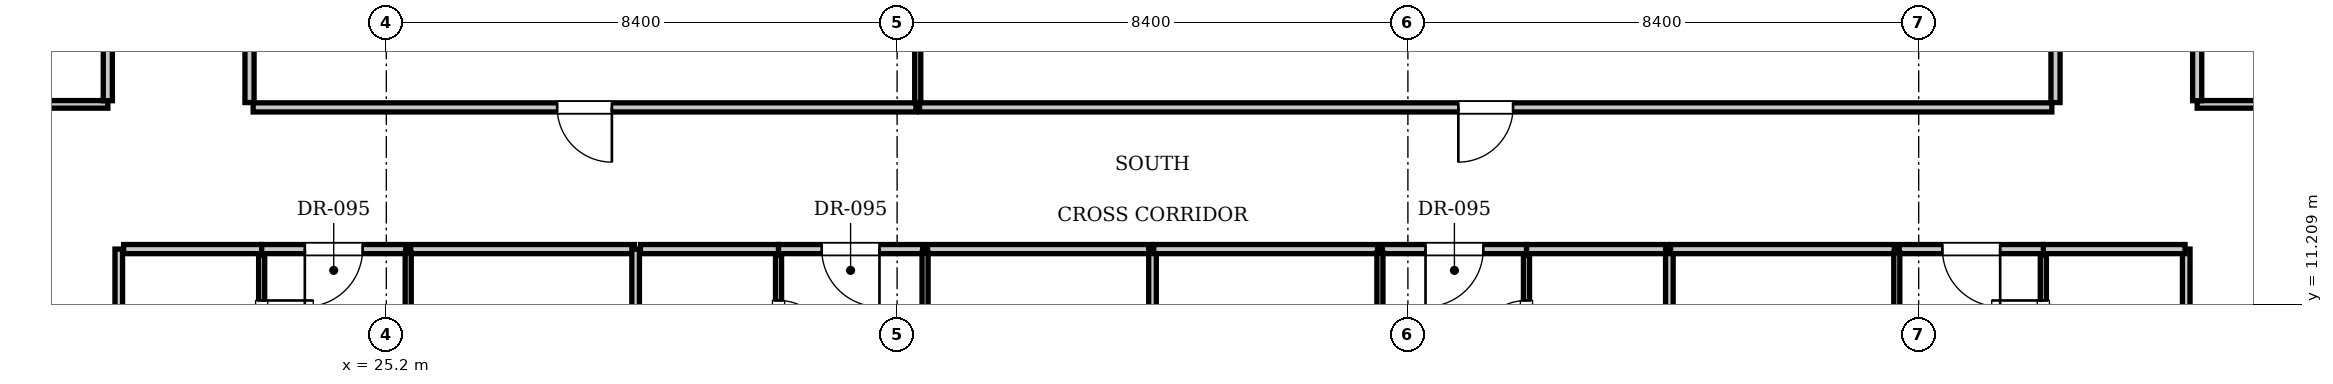
"""IFC4 building model, lengths in metres.
Left out: names, types, materials, properties, quantities, classifications, styles, units other than length and angle.
Written with IfcOpenShell. Run it as: python <this file> out.ifc"""

import sys

from ifc_helpers import new_model, si_unit, direction, frame, frame_2d, origin, place, context, subcontext, project, spatial, rectangle, extrude, element, fill, save


model = new_model("IFC4")
c1 = context("Model", 3, precision=1e-05, world=origin(), true_north=direction((0.0, 1.0)))
c2 = subcontext(c1, "Body", "Model", "MODEL_VIEW")
j1 = project(units=[si_unit("LENGTHUNIT", "METRE"), si_unit("PLANEANGLEUNIT", "RADIAN")], contexts=[c1])
p1 = place(None, origin())
s1 = spatial("IfcSite", under=j1, at=p1, CompositionType="ELEMENT")
p2 = place(p1, origin())
s2 = spatial("IfcBuilding", under=s1, at=p2, CompositionType="ELEMENT")
p3 = place(p2, frame((0.0, 0.0, 96.25)))
s3 = spatial("IfcBuildingStorey", under=s2, at=p3, CompositionType="ELEMENT", Elevation=96.25)
for number, where, z_axis, x_axis in (
    (1, (22.95, 14.53, 0.0), (0.0, 0.0, 1.0), (0.0, 1.0, 0.0)),
    (2, (52.65, 14.53, 0.0), (0.0, 0.0, 1.0), (0.0, 1.0, 0.0)),
):
    element("IfcWall", number, at=place(p3, frame(where, z_axis=z_axis, x_axis=x_axis)), inside=s3, PredefinedType="PARTITIONING", context=c2, shape_type="SweptSolid", body=[
        extrude(rectangle(XDim=8.43, YDim=0.15, at=frame_2d((4.215, 0.0))), origin(), (0.0, 0.0, 1.0), 3.61),
    ])
p4 = place(p3, frame((23.01, 14.45, 0.0), z_axis=(0.0, 0.0, 1.0), x_axis=(1.0, 0.0, 0.0)))
e3 = element("IfcWall", 3, at=p4, inside=s3, PredefinedType="PARTITIONING", context=c2, shape_type="SweptSolid", body=[
    extrude(rectangle(XDim=10.899, YDim=0.15, at=frame_2d((5.449, 0.0))), origin(), (0.0, 0.0, 1.0), 3.61),
])
p5 = place(p4, frame((5.0, 0.0, 0.0)))
e4 = element("IfcOpeningElement", 4, at=p5, cuts=e3, PredefinedType="OPENING", context=c2, shape_type="SweptSolid", body=[
    extrude(rectangle(XDim=0.9, YDim=2.1, at=frame_2d((0.45, 1.05))), frame((0.0, 0.085, 0.0), z_axis=(0.0, -1.0, 0.0), x_axis=(1.0, 0.0, 0.0)), (0.0, 0.0, 1.0), 0.17),
])
p6 = place(p3, frame((33.939, 14.53, 0.0), z_axis=(0.0, 0.0, 1.0), x_axis=(0.0, 1.0, 0.0)))
e5 = element("IfcWall", 5, at=p6, inside=s3, PredefinedType="PARTITIONING", context=c2, shape_type="SweptSolid", body=[
    extrude(rectangle(XDim=8.43, YDim=0.1, at=frame_2d((4.215, 0.0))), origin(), (0.0, 0.0, 1.0), 3.61),
])
p7 = place(p3, frame((33.969, 14.45, 0.0), z_axis=(0.0, 0.0, 1.0), x_axis=(1.0, 0.0, 0.0)))
e6 = element("IfcWall", 6, at=p7, inside=s3, PredefinedType="PARTITIONING", context=c2, shape_type="SweptSolid", body=[
    extrude(rectangle(XDim=18.621, YDim=0.15, at=frame_2d((9.311, 0.0))), origin(), (0.0, 0.0, 1.0), 3.61),
])
p8 = place(p7, frame((8.861, 0.0, 0.0)))
e7 = element("IfcOpeningElement", 7, at=p8, cuts=e6, PredefinedType="OPENING", context=c2, shape_type="SweptSolid", body=[
    extrude(rectangle(XDim=0.9, YDim=2.1, at=frame_2d((0.45, 1.05))), frame((0.0, 0.085, 0.0), z_axis=(0.0, -1.0, 0.0), x_axis=(1.0, 0.0, 0.0)), (0.0, 0.0, 1.0), 0.17),
])
for number, where, z_axis, x_axis in (
    (8, (20.8, 0.1, 0.0), (0.0, 0.0, 1.0), (0.0, 1.0, 0.0)),
    (9, (54.8, 0.1, 0.0), (0.0, 0.0, 1.0), (0.0, 1.0, 0.0)),
):
    element("IfcWall", number, at=place(p3, frame(where, z_axis=z_axis, x_axis=x_axis)), inside=s3, PredefinedType="PARTITIONING", context=c2, shape_type="SweptSolid", body=[
        extrude(rectangle(XDim=12.02, YDim=0.125, at=frame_2d((6.01, 0.0))), origin(), (0.0, 0.0, 1.0), 3.61),
    ])
p9 = place(p3, frame((20.88, 12.12, 0.0), z_axis=(0.0, 0.0, 1.0), x_axis=(1.0, 0.0, 0.0)))
e10 = element("IfcWall", 10, at=p9, inside=s3, PredefinedType="PARTITIONING", context=c2, shape_type="SweptSolid", body=[
    extrude(rectangle(XDim=2.27, YDim=0.15, at=frame_2d((1.135, 0.0))), origin(), (0.0, 0.0, 1.0), 3.61),
])
p10 = place(p3, frame((23.15, 9.68, 0.0), z_axis=(0.0, 0.0, 1.0), x_axis=(0.0, 1.0, 0.0)))
e11 = element("IfcWall", 11, at=p10, inside=s3, PredefinedType="PARTITIONING", context=c2, shape_type="SweptSolid", body=[
    extrude(rectangle(XDim=2.34, YDim=0.1, at=frame_2d((1.17, 0.0))), origin(), (0.0, 0.0, 1.0), 3.61),
])
p11 = place(p10, frame((0.745, 0.0, 0.0)))
e12 = element("IfcOpeningElement", 12, at=p11, cuts=e11, PredefinedType="OPENING", context=c2, shape_type="SweptSolid", body=[
    extrude(rectangle(XDim=0.85, YDim=2.1, at=frame_2d((0.425, 1.05))), frame((0.0, 0.06, 0.0), z_axis=(0.0, -1.0, 0.0), x_axis=(1.0, 0.0, 0.0)), (0.0, 0.0, 1.0), 0.12),
])
p12 = place(p3, frame((23.15, 12.12, 0.0), z_axis=(0.0, 0.0, 1.0), x_axis=(1.0, 0.0, 0.0)))
e13 = element("IfcWall", 13, at=p12, inside=s3, PredefinedType="PARTITIONING", context=c2, shape_type="SweptSolid", body=[
    extrude(rectangle(XDim=2.37, YDim=0.15, at=frame_2d((1.185, 0.0))), origin(), (0.0, 0.0, 1.0), 3.61),
])
p13 = place(p12, frame((0.71, 0.0, 0.0)))
e14 = element("IfcOpeningElement", 14, at=p13, cuts=e13, PredefinedType="OPENING", context=c2, shape_type="SweptSolid", body=[
    extrude(rectangle(XDim=0.95, YDim=2.15, at=frame_2d((0.475, 1.075))), frame((0.0, 0.085, 0.0), z_axis=(0.0, -1.0, 0.0), x_axis=(1.0, 0.0, 0.0)), (0.0, 0.0, 1.0), 0.17),
])
p14 = place(p3, frame((25.6, 12.12, 0.0), z_axis=(0.0, 0.0, 1.0), x_axis=(1.0, 0.0, 0.0)))
e15 = element("IfcWall", 15, at=p14, inside=s3, PredefinedType="PARTITIONING", context=c2, shape_type="SweptSolid", body=[
    extrude(rectangle(XDim=3.68, YDim=0.15, at=frame_2d((1.84, 0.0))), origin(), (0.0, 0.0, 1.0), 3.61),
])
p15 = place(p3, frame((25.56, 0.03, 0.0), z_axis=(0.0, 0.0, 1.0), x_axis=(0.0, 1.0, 0.0)))
e16 = element("IfcWall", 16, at=p15, inside=s3, PredefinedType="PARTITIONING", context=c2, shape_type="SweptSolid", body=[
    extrude(rectangle(XDim=12.03, YDim=0.1, at=frame_2d((6.015, 0.0))), origin(), (0.0, 0.0, 1.0), 3.61),
])
p16 = place(p15, frame((1.6, 0.0, 0.0)))
e17 = element("IfcOpeningElement", 17, at=p16, cuts=e16, PredefinedType="OPENING", context=c2, shape_type="SweptSolid", body=[
    extrude(rectangle(XDim=0.9, YDim=2.1, at=frame_2d((0.45, 1.05))), frame((0.0, 0.06, 0.0), z_axis=(0.0, -1.0, 0.0), x_axis=(1.0, 0.0, 0.0)), (0.0, 0.0, 1.0), 0.12),
])
p17 = place(p3, frame((29.3, 0.1, 0.0), z_axis=(0.0, 0.0, 1.0), x_axis=(0.0, 1.0, 0.0)))
e18 = element("IfcWall", 18, at=p17, inside=s3, PredefinedType="PARTITIONING", context=c2, shape_type="SweptSolid", body=[
    extrude(rectangle(XDim=12.02, YDim=0.125, at=frame_2d((6.01, 0.0))), origin(), (0.0, 0.0, 1.0), 3.293),
])
p18 = place(p3, frame((29.38, 12.12, 0.0), z_axis=(0.0, 0.0, 1.0), x_axis=(1.0, 0.0, 0.0)))
e19 = element("IfcWall", 19, at=p18, inside=s3, PredefinedType="PARTITIONING", context=c2, shape_type="SweptSolid", body=[
    extrude(rectangle(XDim=2.27, YDim=0.15, at=frame_2d((1.135, 0.0))), origin(), (0.0, 0.0, 1.0), 3.61),
])
p19 = place(p3, frame((31.65, 9.68, 0.0), z_axis=(0.0, 0.0, 1.0), x_axis=(0.0, 1.0, 0.0)))
e20 = element("IfcWall", 20, at=p19, inside=s3, PredefinedType="PARTITIONING", context=c2, shape_type="SweptSolid", body=[
    extrude(rectangle(XDim=2.34, YDim=0.1, at=frame_2d((1.17, 0.0))), origin(), (0.0, 0.0, 1.0), 3.61),
])
p20 = place(p19, frame((0.745, 0.0, 0.0)))
e21 = element("IfcOpeningElement", 21, at=p20, cuts=e20, PredefinedType="OPENING", context=c2, shape_type="SweptSolid", body=[
    extrude(rectangle(XDim=0.85, YDim=2.1, at=frame_2d((0.425, 1.05))), frame((0.0, 0.06, 0.0), z_axis=(0.0, -1.0, 0.0), x_axis=(1.0, 0.0, 0.0)), (0.0, 0.0, 1.0), 0.12),
])
p21 = place(p3, frame((31.65, 12.12, 0.0), z_axis=(0.0, 0.0, 1.0), x_axis=(1.0, 0.0, 0.0)))
e22 = element("IfcWall", 22, at=p21, inside=s3, PredefinedType="PARTITIONING", context=c2, shape_type="SweptSolid", body=[
    extrude(rectangle(XDim=2.37, YDim=0.15, at=frame_2d((1.185, 0.0))), origin(), (0.0, 0.0, 1.0), 3.61),
])
p22 = place(p21, frame((0.71, 0.0, 0.0)))
e23 = element("IfcOpeningElement", 23, at=p22, cuts=e22, PredefinedType="OPENING", context=c2, shape_type="SweptSolid", body=[
    extrude(rectangle(XDim=0.95, YDim=2.15, at=frame_2d((0.475, 1.075))), frame((0.0, 0.085, 0.0), z_axis=(0.0, -1.0, 0.0), x_axis=(1.0, 0.0, 0.0)), (0.0, 0.0, 1.0), 0.17),
])
p23 = place(p3, frame((34.1, 12.12, 0.0), z_axis=(0.0, 0.0, 1.0), x_axis=(1.0, 0.0, 0.0)))
e24 = element("IfcWall", 24, at=p23, inside=s3, PredefinedType="PARTITIONING", context=c2, shape_type="SweptSolid", body=[
    extrude(rectangle(XDim=3.68, YDim=0.15, at=frame_2d((1.84, 0.0))), origin(), (0.0, 0.0, 1.0), 3.61),
])
p24 = place(p3, frame((34.06, 0.03, 0.0), z_axis=(0.0, 0.0, 1.0), x_axis=(0.0, 1.0, 0.0)))
e25 = element("IfcWall", 25, at=p24, inside=s3, PredefinedType="PARTITIONING", context=c2, shape_type="SweptSolid", body=[
    extrude(rectangle(XDim=12.03, YDim=0.1, at=frame_2d((6.015, 0.0))), origin(), (0.0, 0.0, 1.0), 3.61),
])
p25 = place(p24, frame((1.6, 0.0, 0.0)))
e26 = element("IfcOpeningElement", 26, at=p25, cuts=e25, PredefinedType="OPENING", context=c2, shape_type="SweptSolid", body=[
    extrude(rectangle(XDim=0.9, YDim=2.1, at=frame_2d((0.45, 1.05))), frame((0.0, 0.06, 0.0), z_axis=(0.0, -1.0, 0.0), x_axis=(1.0, 0.0, 0.0)), (0.0, 0.0, 1.0), 0.12),
])
p26 = place(p3, frame((37.8, 0.1, 0.0), z_axis=(0.0, 0.0, 1.0), x_axis=(0.0, 1.0, 0.0)))
e27 = element("IfcWall", 27, at=p26, inside=s3, PredefinedType="PARTITIONING", context=c2, shape_type="SweptSolid", body=[
    extrude(rectangle(XDim=12.02, YDim=0.125, at=frame_2d((6.01, 0.0))), origin(), (0.0, 0.0, 1.0), 3.344),
])
p27 = place(p3, frame((43.95, 12.12, 0.0), z_axis=(0.0, 0.0, 1.0), x_axis=(1.0, 0.0, 0.0)))
e28 = element("IfcWall", 28, at=p27, inside=s3, PredefinedType="PARTITIONING", context=c2, shape_type="SweptSolid", body=[
    extrude(rectangle(XDim=2.33, YDim=0.15, at=frame_2d((1.165, 0.0))), origin(), (0.0, 0.0, 1.0), 3.61),
])
p28 = place(p3, frame((43.95, 9.68, 0.0), z_axis=(0.0, 0.0, 1.0), x_axis=(0.0, 1.0, 0.0)))
e29 = element("IfcWall", 29, at=p28, inside=s3, PredefinedType="PARTITIONING", context=c2, shape_type="SweptSolid", body=[
    extrude(rectangle(XDim=2.34, YDim=0.1, at=frame_2d((1.17, 0.0))), origin(), (0.0, 0.0, 1.0), 3.61),
])
p29 = place(p28, frame((0.745, 0.0, 0.0)))
e30 = element("IfcOpeningElement", 30, at=p29, cuts=e29, PredefinedType="OPENING", context=c2, shape_type="SweptSolid", body=[
    extrude(rectangle(XDim=0.85, YDim=2.1, at=frame_2d((0.425, 1.05))), frame((0.0, 0.06, 0.0), z_axis=(0.0, -1.0, 0.0), x_axis=(1.0, 0.0, 0.0)), (0.0, 0.0, 1.0), 0.12),
])
p30 = place(p3, frame((37.82, 12.12, 0.0), z_axis=(0.0, 0.0, 1.0), x_axis=(1.0, 0.0, 0.0)))
e31 = element("IfcWall", 31, at=p30, inside=s3, PredefinedType="PARTITIONING", context=c2, shape_type="SweptSolid", body=[
    extrude(rectangle(XDim=3.68, YDim=0.15, at=frame_2d((1.84, 0.0))), origin(), (0.0, 0.0, 1.0), 3.61),
])
p31 = place(p3, frame((41.58, 12.12, 0.0), z_axis=(0.0, 0.0, 1.0), x_axis=(1.0, 0.0, 0.0)))
e32 = element("IfcWall", 32, at=p31, inside=s3, PredefinedType="PARTITIONING", context=c2, shape_type="SweptSolid", body=[
    extrude(rectangle(XDim=2.37, YDim=0.15, at=frame_2d((1.185, 0.0))), origin(), (0.0, 0.0, 1.0), 3.61),
])
p32 = place(p31, frame((0.71, 0.0, 0.0)))
e33 = element("IfcOpeningElement", 33, at=p32, cuts=e32, PredefinedType="OPENING", context=c2, shape_type="SweptSolid", body=[
    extrude(rectangle(XDim=0.95, YDim=2.15, at=frame_2d((0.475, 1.075))), frame((0.0, 0.085, 0.0), z_axis=(0.0, -1.0, 0.0), x_axis=(1.0, 0.0, 0.0)), (0.0, 0.0, 1.0), 0.17),
])
p33 = place(p3, frame((41.54, 0.03, 0.0), z_axis=(0.0, 0.0, 1.0), x_axis=(0.0, 1.0, 0.0)))
e34 = element("IfcWall", 34, at=p33, inside=s3, PredefinedType="PARTITIONING", context=c2, shape_type="SweptSolid", body=[
    extrude(rectangle(XDim=12.03, YDim=0.1, at=frame_2d((6.015, 0.0))), origin(), (0.0, 0.0, 1.0), 3.61),
])
p34 = place(p33, frame((1.6, 0.0, 0.0)))
e35 = element("IfcOpeningElement", 35, at=p34, cuts=e34, PredefinedType="OPENING", context=c2, shape_type="SweptSolid", body=[
    extrude(rectangle(XDim=0.9, YDim=2.1, at=frame_2d((0.45, 1.05))), frame((0.0, 0.06, 0.0), z_axis=(0.0, -1.0, 0.0), x_axis=(1.0, 0.0, 0.0)), (0.0, 0.0, 1.0), 0.12),
])
p35 = place(p3, frame((46.3, 0.1, 0.0), z_axis=(0.0, 0.0, 1.0), x_axis=(0.0, 1.0, 0.0)))
e36 = element("IfcWall", 36, at=p35, inside=s3, PredefinedType="PARTITIONING", context=c2, shape_type="SweptSolid", body=[
    extrude(rectangle(XDim=12.02, YDim=0.125, at=frame_2d((6.01, 0.0))), origin(), (0.0, 0.0, 1.0), 3.403),
])
p36 = place(p3, frame((52.45, 12.12, 0.0), z_axis=(0.0, 0.0, 1.0), x_axis=(1.0, 0.0, 0.0)))
e37 = element("IfcWall", 37, at=p36, inside=s3, PredefinedType="PARTITIONING", context=c2, shape_type="SweptSolid", body=[
    extrude(rectangle(XDim=2.33, YDim=0.15, at=frame_2d((1.165, 0.0))), origin(), (0.0, 0.0, 1.0), 3.61),
])
p37 = place(p3, frame((52.45, 9.68, 0.0), z_axis=(0.0, 0.0, 1.0), x_axis=(0.0, 1.0, 0.0)))
e38 = element("IfcWall", 38, at=p37, inside=s3, PredefinedType="PARTITIONING", context=c2, shape_type="SweptSolid", body=[
    extrude(rectangle(XDim=2.34, YDim=0.1, at=frame_2d((1.17, 0.0))), origin(), (0.0, 0.0, 1.0), 3.61),
])
p38 = place(p37, frame((0.745, 0.0, 0.0)))
e39 = element("IfcOpeningElement", 39, at=p38, cuts=e38, PredefinedType="OPENING", context=c2, shape_type="SweptSolid", body=[
    extrude(rectangle(XDim=0.85, YDim=2.1, at=frame_2d((0.425, 1.05))), frame((0.0, 0.06, 0.0), z_axis=(0.0, -1.0, 0.0), x_axis=(1.0, 0.0, 0.0)), (0.0, 0.0, 1.0), 0.12),
])
p39 = place(p3, frame((46.32, 12.12, 0.0), z_axis=(0.0, 0.0, 1.0), x_axis=(1.0, 0.0, 0.0)))
e40 = element("IfcWall", 40, at=p39, inside=s3, PredefinedType="PARTITIONING", context=c2, shape_type="SweptSolid", body=[
    extrude(rectangle(XDim=3.68, YDim=0.15, at=frame_2d((1.84, 0.0))), origin(), (0.0, 0.0, 1.0), 3.61),
])
p40 = place(p3, frame((50.08, 12.12, 0.0), z_axis=(0.0, 0.0, 1.0), x_axis=(1.0, 0.0, 0.0)))
e41 = element("IfcWall", 41, at=p40, inside=s3, PredefinedType="PARTITIONING", context=c2, shape_type="SweptSolid", body=[
    extrude(rectangle(XDim=2.37, YDim=0.15, at=frame_2d((1.185, 0.0))), origin(), (0.0, 0.0, 1.0), 3.61),
])
p41 = place(p40, frame((0.71, 0.0, 0.0)))
e42 = element("IfcOpeningElement", 42, at=p41, cuts=e41, PredefinedType="OPENING", context=c2, shape_type="SweptSolid", body=[
    extrude(rectangle(XDim=0.95, YDim=2.15, at=frame_2d((0.475, 1.075))), frame((0.0, 0.085, 0.0), z_axis=(0.0, -1.0, 0.0), x_axis=(1.0, 0.0, 0.0)), (0.0, 0.0, 1.0), 0.17),
])
p42 = place(p3, frame((50.04, 0.03, 0.0), z_axis=(0.0, 0.0, 1.0), x_axis=(0.0, 1.0, 0.0)))
e43 = element("IfcWall", 43, at=p42, inside=s3, PredefinedType="PARTITIONING", context=c2, shape_type="SweptSolid", body=[
    extrude(rectangle(XDim=12.03, YDim=0.1, at=frame_2d((6.015, 0.0))), origin(), (0.0, 0.0, 1.0), 3.61),
])
p43 = place(p42, frame((1.6, 0.0, 0.0)))
e44 = element("IfcOpeningElement", 44, at=p43, cuts=e43, PredefinedType="OPENING", context=c2, shape_type="SweptSolid", body=[
    extrude(rectangle(XDim=0.9, YDim=2.1, at=frame_2d((0.45, 1.05))), frame((0.0, 0.06, 0.0), z_axis=(0.0, -1.0, 0.0), x_axis=(1.0, 0.0, 0.0)), (0.0, 0.0, 1.0), 0.12),
])
p44 = place(p3, frame((10.9, 14.5, 0.0), z_axis=(0.0, 0.0, 1.0), x_axis=(1.0, 0.0, 0.0)))
e45 = element("IfcWall", 45, at=p44, inside=s3, PredefinedType="PARTITIONING", context=c2, shape_type="SweptSolid", body=[
    extrude(rectangle(XDim=9.72, YDim=0.125, at=frame_2d((4.86, 0.0))), origin(), (0.0, 0.0, 1.0), 3.61),
])
p45 = place(p3, frame((54.98, 14.5, 0.0), z_axis=(0.0, 0.0, 1.0), x_axis=(1.0, 0.0, 0.0)))
e46 = element("IfcWall", 46, at=p45, inside=s3, PredefinedType="PARTITIONING", context=c2, shape_type="SweptSolid", body=[
    extrude(rectangle(XDim=9.72, YDim=0.125, at=frame_2d((4.86, 0.0))), origin(), (0.0, 0.0, 1.0), 3.61),
])
for number, where, z_axis, x_axis in (
    (47, (20.62, 14.56, 0.0), (0.0, 0.0, 1.0), (0.0, 1.0, 0.0)),
    (48, (54.98, 14.56, 0.0), (0.0, 0.0, 1.0), (0.0, 1.0, 0.0)),
):
    element("IfcWall", number, at=place(p3, frame(where, z_axis=z_axis, x_axis=x_axis)), inside=s3, PredefinedType="PARTITIONING", context=c2, shape_type="SweptSolid", body=[
        extrude(rectangle(XDim=2.02, YDim=0.15, at=frame_2d((1.01, 0.0))), origin(), (0.0, 0.0, 1.0), 3.61),
    ])
p46 = place(p5, frame((0.9, 0.0, 0.0), z_axis=(0.0, 0.0, 1.0), x_axis=(-1.0, 0.0, 0.0)))
e49 = element("IfcDoor", 49, at=p46, inside=s3, OperationType="SINGLE_SWING_LEFT", PredefinedType="DOOR", context=c2, shape_type="SweptSolid", body=[
    extrude(rectangle(XDim=0.9, YDim=2.1, at=frame_2d((0.45, 1.05))), frame((0.0, 0.025, 0.0), z_axis=(0.0, -1.0, 0.0), x_axis=(1.0, 0.0, 0.0)), (0.0, 0.0, 1.0), 0.05),
])
fill(e4, e49)
p47 = place(p8, frame((0.9, 0.0, 0.0), z_axis=(0.0, 0.0, 1.0), x_axis=(-1.0, 0.0, 0.0)))
e50 = element("IfcDoor", 50, at=p47, inside=s3, OperationType="SINGLE_SWING_RIGHT", PredefinedType="DOOR", context=c2, shape_type="SweptSolid", body=[
    extrude(rectangle(XDim=0.9, YDim=2.1, at=frame_2d((0.45, 1.05))), frame((0.0, 0.025, 0.0), z_axis=(0.0, -1.0, 0.0), x_axis=(1.0, 0.0, 0.0)), (0.0, 0.0, 1.0), 0.05),
])
fill(e7, e50)
p48 = place(p11, frame((0.85, 0.0, 0.0), z_axis=(0.0, 0.0, 1.0), x_axis=(-1.0, 0.0, 0.0)))
e51 = element("IfcDoor", 51, at=p48, inside=s3, OperationType="SINGLE_SWING_LEFT", PredefinedType="DOOR", context=c2, shape_type="SweptSolid", body=[
    extrude(rectangle(XDim=0.85, YDim=2.1, at=frame_2d((0.425, 1.05))), frame((0.0, 0.025, 0.0), z_axis=(0.0, -1.0, 0.0), x_axis=(1.0, 0.0, 0.0)), (0.0, 0.0, 1.0), 0.05),
])
fill(e12, e51)
p49 = place(p13, frame((0.95, 0.0, 0.0), z_axis=(0.0, 0.0, 1.0), x_axis=(-1.0, 0.0, 0.0)))
e52 = element("IfcDoor", 52, at=p49, inside=s3, OperationType="SINGLE_SWING_RIGHT", PredefinedType="DOOR", context=c2, shape_type="SweptSolid", body=[
    extrude(rectangle(XDim=0.95, YDim=2.15, at=frame_2d((0.475, 1.075))), frame((0.0, 0.025, 0.0), z_axis=(0.0, -1.0, 0.0), x_axis=(1.0, 0.0, 0.0)), (0.0, 0.0, 1.0), 0.05),
])
fill(e14, e52)
p50 = place(p20, frame((0.85, 0.0, 0.0), z_axis=(0.0, 0.0, 1.0), x_axis=(-1.0, 0.0, 0.0)))
e53 = element("IfcDoor", 53, at=p50, inside=s3, OperationType="SINGLE_SWING_RIGHT", PredefinedType="DOOR", context=c2, shape_type="SweptSolid", body=[
    extrude(rectangle(XDim=0.85, YDim=2.1, at=frame_2d((0.425, 1.05))), frame((0.0, 0.025, 0.0), z_axis=(0.0, -1.0, 0.0), x_axis=(1.0, 0.0, 0.0)), (0.0, 0.0, 1.0), 0.05),
])
fill(e21, e53)
p51 = place(p22, frame((0.95, 0.0, 0.0), z_axis=(0.0, 0.0, 1.0), x_axis=(-1.0, 0.0, 0.0)))
e54 = element("IfcDoor", 54, at=p51, inside=s3, OperationType="SINGLE_SWING_LEFT", PredefinedType="DOOR", context=c2, shape_type="SweptSolid", body=[
    extrude(rectangle(XDim=0.95, YDim=2.15, at=frame_2d((0.475, 1.075))), frame((0.0, 0.025, 0.0), z_axis=(0.0, -1.0, 0.0), x_axis=(1.0, 0.0, 0.0)), (0.0, 0.0, 1.0), 0.05),
])
fill(e23, e54)
p52 = place(p29, origin())
e55 = element("IfcDoor", 55, at=p52, inside=s3, OperationType="SINGLE_SWING_LEFT", PredefinedType="DOOR", context=c2, shape_type="SweptSolid", body=[
    extrude(rectangle(XDim=0.85, YDim=2.1, at=frame_2d((0.425, 1.05))), frame((0.0, 0.025, 0.0), z_axis=(0.0, -1.0, 0.0), x_axis=(1.0, 0.0, 0.0)), (0.0, 0.0, 1.0), 0.05),
])
fill(e30, e55)
p53 = place(p32, frame((0.95, 0.0, 0.0), z_axis=(0.0, 0.0, 1.0), x_axis=(-1.0, 0.0, 0.0)))
e56 = element("IfcDoor", 56, at=p53, inside=s3, OperationType="SINGLE_SWING_RIGHT", PredefinedType="DOOR", context=c2, shape_type="SweptSolid", body=[
    extrude(rectangle(XDim=0.95, YDim=2.15, at=frame_2d((0.475, 1.075))), frame((0.0, 0.025, 0.0), z_axis=(0.0, -1.0, 0.0), x_axis=(1.0, 0.0, 0.0)), (0.0, 0.0, 1.0), 0.05),
])
fill(e33, e56)
p54 = place(p38, origin())
e57 = element("IfcDoor", 57, at=p54, inside=s3, OperationType="SINGLE_SWING_RIGHT", PredefinedType="DOOR", context=c2, shape_type="SweptSolid", body=[
    extrude(rectangle(XDim=0.85, YDim=2.1, at=frame_2d((0.425, 1.05))), frame((0.0, 0.025, 0.0), z_axis=(0.0, -1.0, 0.0), x_axis=(1.0, 0.0, 0.0)), (0.0, 0.0, 1.0), 0.05),
])
fill(e39, e57)
p55 = place(p41, frame((0.95, 0.0, 0.0), z_axis=(0.0, 0.0, 1.0), x_axis=(-1.0, 0.0, 0.0)))
e58 = element("IfcDoor", 58, at=p55, inside=s3, OperationType="SINGLE_SWING_LEFT", PredefinedType="DOOR", context=c2, shape_type="SweptSolid", body=[
    extrude(rectangle(XDim=0.95, YDim=2.15, at=frame_2d((0.475, 1.075))), frame((0.0, 0.025, 0.0), z_axis=(0.0, -1.0, 0.0), x_axis=(1.0, 0.0, 0.0)), (0.0, 0.0, 1.0), 0.05),
])
fill(e42, e58)
save(model, sys.argv[1])
